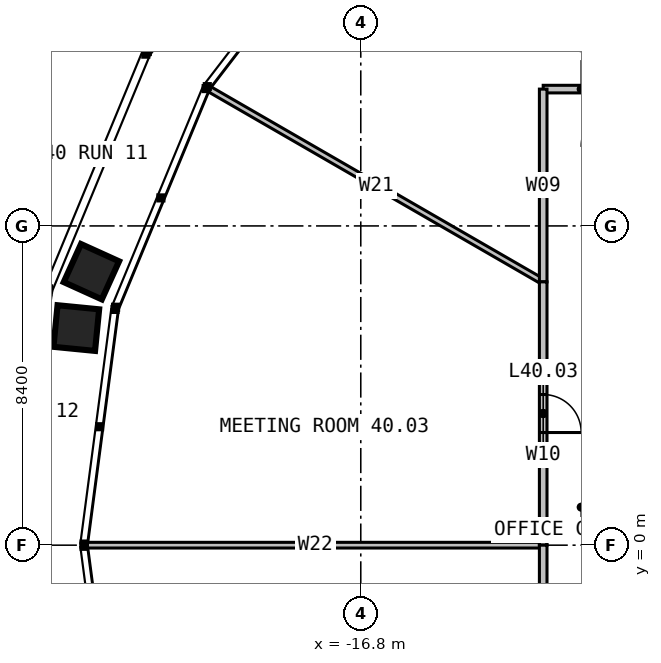
"""IFC4 building model, lengths in metres.
Left out: names, types, materials, properties, quantities, classifications, styles, units other than length and angle.
Written with IfcOpenShell. Run it as: python <this file> out.ifc"""

import sys

from ifc_helpers import new_model, si_unit, direction, frame, frame_2d, origin, place, context, subcontext, project, spatial, rectangle, extrude, element, fill, save


model = new_model("IFC4")
c1 = context("Model", 3, precision=1e-05, world=origin(), true_north=direction((0.0, 1.0)))
c2 = subcontext(c1, "Body", "Model", "MODEL_VIEW")
j1 = project(units=[si_unit("LENGTHUNIT", "METRE"), si_unit("PLANEANGLEUNIT", "RADIAN")], contexts=[c1])
p1 = place(None, origin())
s1 = spatial("IfcSite", under=j1, at=p1, CompositionType="ELEMENT")
p2 = place(p1, origin())
s2 = spatial("IfcBuilding", under=s1, at=p2, CompositionType="ELEMENT")
p3 = place(p2, frame((0.0, 0.0, 167.0)))
s3 = spatial("IfcBuildingStorey", under=s2, at=p3, CompositionType="ELEMENT", Elevation=167.0)
p4 = place(p3, frame((-12.0, 6.928, 0.0), z_axis=(0.0, 0.0, 1.0), x_axis=(-0.866025941747, 0.49999906822, 0.0)))
e1 = element("IfcWall", 1, at=p4, inside=s3, PredefinedType="PARTITIONING", context=c2, shape_type="SweptSolid", body=[
    extrude(rectangle(XDim=10.136, YDim=0.15, at=frame_2d((5.068, 0.0))), origin(), (0.0, 0.0, 1.0), 2.79),
])
p5 = place(p3, frame((-12.0, 0.0, 0.0), z_axis=(0.0, 0.0, 1.0), x_axis=(-1.0, 0.0, 0.0)))
e2 = element("IfcWall", 2, at=p5, inside=s3, PredefinedType="PARTITIONING", context=c2, shape_type="SweptSolid", body=[
    extrude(rectangle(XDim=11.992, YDim=0.15, at=frame_2d((5.996, 0.0))), origin(), (0.0, 0.0, 1.0), 2.79),
])
p6 = place(p3, frame((-10.0, 12.0, 0.0), z_axis=(0.0, 0.0, 1.0), x_axis=(-1.0, 0.0, 0.0)))
e3 = element("IfcWall", 3, at=p6, inside=s3, PredefinedType="PARTITIONING", context=c2, shape_type="SweptSolid", body=[
    extrude(rectangle(XDim=2.0, YDim=0.2, at=frame_2d((1.0, 0.0))), origin(), (0.0, 0.0, 1.0), 3.8),
])
p7 = place(p3, frame((-12.0, 12.0, 0.0), z_axis=(0.0, 0.0, 1.0), x_axis=(0.0, -1.0, 0.0)))
e4 = element("IfcWall", 4, at=p7, inside=s3, PredefinedType="PARTITIONING", context=c2, shape_type="SweptSolid", body=[
    extrude(rectangle(XDim=5.072, YDim=0.2, at=frame_2d((2.536, 0.0))), origin(), (0.0, 0.0, 1.0), 3.8),
])
p8 = place(p3, frame((-12.0, 6.928, 0.0), z_axis=(0.0, 0.0, 1.0), x_axis=(0.0, -1.0, 0.0)))
e5 = element("IfcWall", 5, at=p8, inside=s3, PredefinedType="PARTITIONING", context=c2, shape_type="SweptSolid", body=[
    extrude(rectangle(XDim=6.928, YDim=0.2, at=frame_2d((3.464, 0.0))), origin(), (0.0, 0.0, 1.0), 3.8),
])
p9 = place(p8, frame((2.964, 0.0, 0.0)))
e6 = element("IfcOpeningElement", 6, at=p9, cuts=e5, PredefinedType="OPENING", context=c2, shape_type="SweptSolid", body=[
    extrude(rectangle(XDim=1.0, YDim=2.2, at=frame_2d((0.5, 1.1))), frame((0.0, 0.11, 0.0), z_axis=(0.0, -1.0, 0.0), x_axis=(1.0, 0.0, 0.0)), (0.0, 0.0, 1.0), 0.22),
])
p10 = place(p3, frame((-12.0, 0.0, 0.0), z_axis=(0.0, 0.0, 1.0), x_axis=(0.0, -1.0, 0.0)))
e7 = element("IfcWall", 7, at=p10, inside=s3, PredefinedType="PARTITIONING", context=c2, shape_type="SweptSolid", body=[
    extrude(rectangle(XDim=6.928, YDim=0.2, at=frame_2d((3.464, 0.0))), origin(), (0.0, 0.0, 1.0), 3.8),
])
p11 = place(p10, frame((2.964, 0.0, 0.0)))
e8 = element("IfcOpeningElement", 8, at=p11, cuts=e7, PredefinedType="OPENING", context=c2, shape_type="SweptSolid", body=[
    extrude(rectangle(XDim=1.0, YDim=2.2, at=frame_2d((0.5, 1.1))), frame((0.0, 0.11, 0.0), z_axis=(0.0, -1.0, 0.0), x_axis=(1.0, 0.0, 0.0)), (0.0, 0.0, 1.0), 0.22),
])
p12 = place(p9, origin())
e9 = element("IfcDoor", 9, at=p12, inside=s3, OperationType="SINGLE_SWING_RIGHT", PredefinedType="DOOR", context=c2, shape_type="SweptSolid", body=[
    extrude(rectangle(XDim=1.0, YDim=2.2, at=frame_2d((0.5, 1.1))), frame((0.0, 0.025, 0.0), z_axis=(0.0, -1.0, 0.0), x_axis=(1.0, 0.0, 0.0)), (0.0, 0.0, 1.0), 0.05),
])
fill(e6, e9)
save(model, sys.argv[1])
